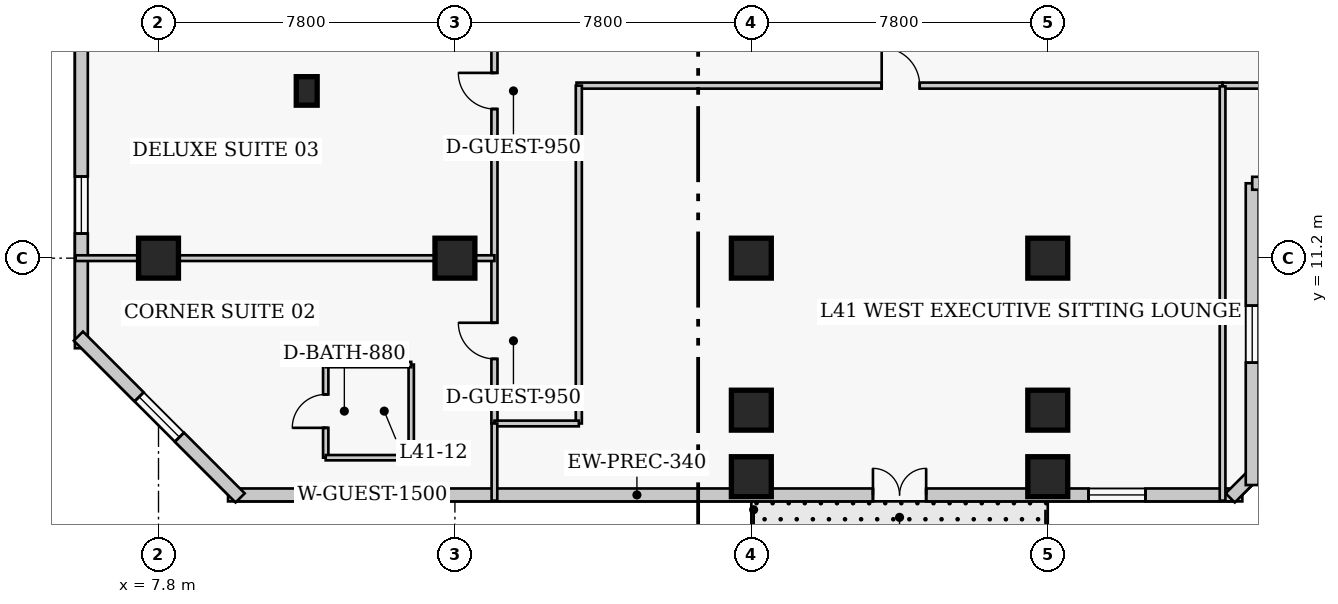
"""IFC4 building model, lengths in metres.
Left out: names, types, materials, properties, quantities, classifications, styles, units other than length and angle.
Written with IfcOpenShell. Run it as: python <this file> out.ifc"""

import sys

from ifc_helpers import new_model, si_unit, direction, frame, frame_2d, origin, origin_2d, place, context, subcontext, project, spatial, rectangle, extrude, element, fill, save


model = new_model("IFC4")
c1 = context("Model", 3, precision=1e-05, world=origin(), true_north=direction((0.0, 1.0)))
c2 = subcontext(c1, "Body", "Model", "MODEL_VIEW")
j1 = project(units=[si_unit("LENGTHUNIT", "METRE"), si_unit("PLANEANGLEUNIT", "RADIAN")], contexts=[c1])
p1 = place(None, origin())
s1 = spatial("IfcSite", under=j1, at=p1, CompositionType="ELEMENT")
p2 = place(p1, origin())
s2 = spatial("IfcBuilding", under=s1, at=p2, CompositionType="ELEMENT")
p3 = place(p2, frame((0.0, 0.0, 165.0)))
s3 = spatial("IfcBuildingStorey", under=s2, at=p3, CompositionType="ELEMENT", Elevation=165.0)
for number, where, z_axis, x_axis in (
    (1, (7.8, 11.2, 0.0), (0.0, 0.0, 1.0), (1.0, 0.0, 0.0)),
    (2, (15.6, 11.2, 0.0), (0.0, 0.0, 1.0), (1.0, 0.0, 0.0)),
    (3, (23.4, 11.2, 0.0), (0.0, 0.0, 1.0), (1.0, 0.0, 0.0)),
    (4, (31.2, 11.2, 0.0), (0.0, 0.0, 1.0), (1.0, 0.0, 0.0)),
    (5, (23.4, 7.2, 0.0), (0.0, 0.0, 1.0), (1.0, 0.0, 0.0)),
    (6, (31.2, 7.2, 0.0), (0.0, 0.0, 1.0), (1.0, 0.0, 0.0)),
    (7, (23.4, 5.45, 0.0), (0.0, 0.0, 1.0), (1.0, 0.0, 0.0)),
    (8, (31.2, 5.45, 0.0), (0.0, 0.0, 1.0), (1.0, 0.0, 0.0)),
):
    element("IfcColumn", number, at=place(p3, frame(where, z_axis=z_axis, x_axis=x_axis)), inside=s3, PredefinedType="COLUMN", context=c2, shape_type="SweptSolid", body=[
        extrude(rectangle(XDim=1.05, YDim=1.05, at=origin_2d()), origin(), (0.0, 0.0, 1.0), 3.8),
    ])
p4 = place(p3, frame((11.7, 15.6, 0.0), z_axis=(0.0, 0.0, 1.0), x_axis=(1.0, 0.0, 0.0)))
e9 = element("IfcColumn", 9, at=p4, inside=s3, PredefinedType="PILASTER", context=c2, shape_type="SweptSolid", body=[
    extrude(rectangle(XDim=0.55, YDim=0.75, at=origin_2d()), origin(), (0.0, 0.0, 1.0), 3.8),
])
p5 = place(p3, frame((9.63, 4.97, 0.0), z_axis=(0.0, 0.0, 1.0), x_axis=(1.0, 0.0, 0.0)))
e10 = element("IfcWall", 10, at=p5, inside=s3, PredefinedType="SOLIDWALL", context=c2, shape_type="SweptSolid", body=[
    extrude(rectangle(XDim=26.69, YDim=0.34, at=frame_2d((13.345, 0.0))), origin(), (0.0, 0.0, 1.0), 3.55),
])
p6 = place(p5, frame((16.97, 0.0, 0.0)))
e11 = element("IfcOpeningElement", 11, at=p6, cuts=e10, PredefinedType="OPENING", context=c2, shape_type="SweptSolid", body=[
    extrude(rectangle(XDim=1.4, YDim=2.15, at=frame_2d((0.7, 1.075))), frame((0.0, 0.18, 0.0), z_axis=(0.0, -1.0, 0.0), x_axis=(1.0, 0.0, 0.0)), (0.0, 0.0, 1.0), 0.36),
])
p7 = place(p5, frame((3.048, 0.0, 0.85)))
e12 = element("IfcOpeningElement", 12, at=p7, cuts=e10, PredefinedType="OPENING", context=c2, shape_type="SweptSolid", body=[
    extrude(rectangle(XDim=1.5, YDim=1.75, at=frame_2d((0.75, 0.875))), frame((0.0, 0.18, 0.0), z_axis=(0.0, -1.0, 0.0), x_axis=(1.0, 0.0, 0.0)), (0.0, 0.0, 1.0), 0.36),
])
p8 = place(p5, frame((22.642, 0.0, 0.85)))
e13 = element("IfcOpeningElement", 13, at=p8, cuts=e10, PredefinedType="OPENING", context=c2, shape_type="SweptSolid", body=[
    extrude(rectangle(XDim=1.5, YDim=1.75, at=frame_2d((0.75, 0.875))), frame((0.0, 0.18, 0.0), z_axis=(0.0, -1.0, 0.0), x_axis=(1.0, 0.0, 0.0)), (0.0, 0.0, 1.0), 0.36),
])
p9 = place(p3, frame((36.001, 4.892, 0.0), z_axis=(0.0, 0.0, 1.0), x_axis=(0.707106781187, 0.707106781187, 0.0)))
e14 = element("IfcWall", 14, at=p9, inside=s3, PredefinedType="SOLIDWALL", context=c2, shape_type="SweptSolid", body=[
    extrude(rectangle(XDim=0.929, YDim=0.34, at=frame_2d((0.464, 0.0))), origin(), (0.0, 0.0, 1.0), 3.55),
])
p10 = place(p3, frame((36.58, 5.23, 0.0), z_axis=(0.0, 0.0, 1.0), x_axis=(0.0, 1.0, 0.0)))
e15 = element("IfcWall", 15, at=p10, inside=s3, PredefinedType="SOLIDWALL", context=c2, shape_type="SweptSolid", body=[
    extrude(rectangle(XDim=7.94, YDim=0.34, at=frame_2d((3.97, 0.0))), origin(), (0.0, 0.0, 1.0), 3.55),
])
p11 = place(p10, frame((3.22, 0.0, 0.85)))
e16 = element("IfcOpeningElement", 16, at=p11, cuts=e15, PredefinedType="OPENING", context=c2, shape_type="SweptSolid", body=[
    extrude(rectangle(XDim=1.5, YDim=1.75, at=frame_2d((0.75, 0.875))), frame((0.0, 0.18, 0.0), z_axis=(0.0, -1.0, 0.0), x_axis=(1.0, 0.0, 0.0)), (0.0, 0.0, 1.0), 0.36),
])
p12 = place(p3, frame((36.58, 13.17, 0.0), z_axis=(0.0, 0.0, 1.0), x_axis=(1.0, 0.0, 0.0)))
e17 = element("IfcWall", 17, at=p12, inside=s3, PredefinedType="SOLIDWALL", context=c2, shape_type="SweptSolid", body=[
    extrude(rectangle(XDim=4.84, YDim=0.34, at=frame_2d((2.42, 0.0))), origin(), (0.0, 0.0, 1.0), 3.55),
])
p13 = place(p12, frame((1.67, 0.0, 0.85)))
e18 = element("IfcOpeningElement", 18, at=p13, cuts=e17, PredefinedType="OPENING", context=c2, shape_type="SweptSolid", body=[
    extrude(rectangle(XDim=1.5, YDim=1.75, at=frame_2d((0.75, 0.875))), frame((0.0, 0.18, 0.0), z_axis=(0.0, -1.0, 0.0), x_axis=(1.0, 0.0, 0.0)), (0.0, 0.0, 1.0), 0.36),
])
p14 = place(p3, frame((5.77, 38.97, 0.0), z_axis=(0.0, 0.0, 1.0), x_axis=(0.0, -1.0, 0.0)))
e19 = element("IfcWall", 19, at=p14, inside=s3, PredefinedType="SOLIDWALL", context=c2, shape_type="SweptSolid", body=[
    extrude(rectangle(XDim=30.14, YDim=0.34, at=frame_2d((15.07, 0.0))), origin(), (0.0, 0.0, 1.0), 3.55),
])
p15 = place(p14, frame((3.667, 0.0, 0.85)))
e20 = element("IfcOpeningElement", 20, at=p15, cuts=e19, PredefinedType="OPENING", context=c2, shape_type="SweptSolid", body=[
    extrude(rectangle(XDim=1.5, YDim=1.75, at=frame_2d((0.75, 0.875))), frame((0.0, 0.18, 0.0), z_axis=(0.0, -1.0, 0.0), x_axis=(1.0, 0.0, 0.0)), (0.0, 0.0, 1.0), 0.36),
])
p16 = place(p14, frame((10.552, 0.0, 0.85)))
e21 = element("IfcOpeningElement", 21, at=p16, cuts=e19, PredefinedType="OPENING", context=c2, shape_type="SweptSolid", body=[
    extrude(rectangle(XDim=1.5, YDim=1.75, at=frame_2d((0.75, 0.875))), frame((0.0, 0.18, 0.0), z_axis=(0.0, -1.0, 0.0), x_axis=(1.0, 0.0, 0.0)), (0.0, 0.0, 1.0), 0.36),
])
p17 = place(p14, frame((16.938, 0.0, 0.85)))
e22 = element("IfcOpeningElement", 22, at=p17, cuts=e19, PredefinedType="OPENING", context=c2, shape_type="SweptSolid", body=[
    extrude(rectangle(XDim=1.5, YDim=1.75, at=frame_2d((0.75, 0.875))), frame((0.0, 0.18, 0.0), z_axis=(0.0, -1.0, 0.0), x_axis=(1.0, 0.0, 0.0)), (0.0, 0.0, 1.0), 0.36),
])
p18 = place(p14, frame((25.623, 0.0, 0.85)))
e23 = element("IfcOpeningElement", 23, at=p18, cuts=e19, PredefinedType="OPENING", context=c2, shape_type="SweptSolid", body=[
    extrude(rectangle(XDim=1.5, YDim=1.75, at=frame_2d((0.75, 0.875))), frame((0.0, 0.18, 0.0), z_axis=(0.0, -1.0, 0.0), x_axis=(1.0, 0.0, 0.0)), (0.0, 0.0, 1.0), 0.36),
])
p19 = place(p3, frame((5.692, 9.148, 0.0), z_axis=(0.0, 0.0, 1.0), x_axis=(0.707106781187, -0.707106781187, 0.0)))
e24 = element("IfcWall", 24, at=p19, inside=s3, PredefinedType="SOLIDWALL", context=c2, shape_type="SweptSolid", body=[
    extrude(rectangle(XDim=6.02, YDim=0.34, at=frame_2d((3.01, 0.0))), origin(), (0.0, 0.0, 1.0), 3.55),
])
p20 = place(p19, frame((2.26, 0.0, 0.85)))
e25 = element("IfcOpeningElement", 25, at=p20, cuts=e24, PredefinedType="OPENING", context=c2, shape_type="SweptSolid", body=[
    extrude(rectangle(XDim=1.5, YDim=1.75, at=frame_2d((0.75, 0.875))), frame((0.0, 0.18, 0.0), z_axis=(0.0, -1.0, 0.0), x_axis=(1.0, 0.0, 0.0)), (0.0, 0.0, 1.0), 0.36),
])
p21 = place(p3, frame((18.8, 15.74, 0.0), z_axis=(0.0, 0.0, 1.0), x_axis=(1.0, 0.0, 0.0)))
e26 = element("IfcWall", 26, at=p21, inside=s3, PredefinedType="PARTITIONING", context=c2, shape_type="SweptSolid", body=[
    extrude(rectangle(XDim=17.0, YDim=0.16, at=frame_2d((8.5, 0.0))), origin(), (0.0, 0.0, 1.0), 3.55),
])
p22 = place(p21, frame((8.03, 0.0, 0.0)))
e27 = element("IfcOpeningElement", 27, at=p22, cuts=e26, PredefinedType="OPENING", context=c2, shape_type="SweptSolid", body=[
    extrude(rectangle(XDim=1.0, YDim=2.15, at=frame_2d((0.5, 1.075))), frame((0.0, 0.09, 0.0), z_axis=(0.0, -1.0, 0.0), x_axis=(1.0, 0.0, 0.0)), (0.0, 0.0, 1.0), 0.18),
])
p23 = place(p3, frame((35.8, 15.74, 0.0), z_axis=(0.0, 0.0, 1.0), x_axis=(1.0, 0.0, 0.0)))
e28 = element("IfcWall", 28, at=p23, inside=s3, PredefinedType="PARTITIONING", context=c2, shape_type="SweptSolid", body=[
    extrude(rectangle(XDim=23.5, YDim=0.16, at=frame_2d((11.75, 0.0))), origin(), (0.0, 0.0, 1.0), 3.55),
])
p24 = place(p23, frame((3.66, 0.0, 0.0)))
e29 = element("IfcOpeningElement", 29, at=p24, cuts=e28, PredefinedType="OPENING", context=c2, shape_type="SweptSolid", body=[
    extrude(rectangle(XDim=0.95, YDim=2.1, at=frame_2d((0.475, 1.05))), frame((0.0, 0.09, 0.0), z_axis=(0.0, -1.0, 0.0), x_axis=(1.0, 0.0, 0.0)), (0.0, 0.0, 1.0), 0.18),
])
p25 = place(p23, frame((16.805, 0.0, 0.0)))
e30 = element("IfcOpeningElement", 30, at=p25, cuts=e28, PredefinedType="OPENING", context=c2, shape_type="SweptSolid", body=[
    extrude(rectangle(XDim=1.0, YDim=2.15, at=frame_2d((0.5, 1.075))), frame((0.0, 0.09, 0.0), z_axis=(0.0, -1.0, 0.0), x_axis=(1.0, 0.0, 0.0)), (0.0, 0.0, 1.0), 0.18),
])
p26 = place(p3, frame((16.64, 6.85, 0.0), z_axis=(0.0, 0.0, 1.0), x_axis=(0.0, 1.0, 0.0)))
e31 = element("IfcWall", 31, at=p26, inside=s3, PredefinedType="PARTITIONING", context=c2, shape_type="SweptSolid", body=[
    extrude(rectangle(XDim=33.8, YDim=0.16, at=frame_2d((16.9, 0.0))), origin(), (0.0, 0.0, 1.0), 3.55),
])
p27 = place(p26, frame((1.7, 0.0, 0.0)))
e32 = element("IfcOpeningElement", 32, at=p27, cuts=e31, PredefinedType="OPENING", context=c2, shape_type="SweptSolid", body=[
    extrude(rectangle(XDim=0.95, YDim=2.1, at=frame_2d((0.475, 1.05))), frame((0.0, 0.09, 0.0), z_axis=(0.0, -1.0, 0.0), x_axis=(1.0, 0.0, 0.0)), (0.0, 0.0, 1.0), 0.18),
])
p28 = place(p26, frame((8.275, 0.0, 0.0)))
e33 = element("IfcOpeningElement", 33, at=p28, cuts=e31, PredefinedType="OPENING", context=c2, shape_type="SweptSolid", body=[
    extrude(rectangle(XDim=0.95, YDim=2.1, at=frame_2d((0.475, 1.05))), frame((0.0, 0.09, 0.0), z_axis=(0.0, -1.0, 0.0), x_axis=(1.0, 0.0, 0.0)), (0.0, 0.0, 1.0), 0.18),
])
p29 = place(p26, frame((17.075, 0.0, 0.0)))
e34 = element("IfcOpeningElement", 34, at=p29, cuts=e31, PredefinedType="OPENING", context=c2, shape_type="SweptSolid", body=[
    extrude(rectangle(XDim=0.95, YDim=2.1, at=frame_2d((0.475, 1.05))), frame((0.0, 0.09, 0.0), z_axis=(0.0, -1.0, 0.0), x_axis=(1.0, 0.0, 0.0)), (0.0, 0.0, 1.0), 0.18),
])
p30 = place(p26, frame((25.125, 0.0, 0.0)))
e35 = element("IfcOpeningElement", 35, at=p30, cuts=e31, PredefinedType="OPENING", context=c2, shape_type="SweptSolid", body=[
    extrude(rectangle(XDim=0.95, YDim=2.1, at=frame_2d((0.475, 1.05))), frame((0.0, 0.09, 0.0), z_axis=(0.0, -1.0, 0.0), x_axis=(1.0, 0.0, 0.0)), (0.0, 0.0, 1.0), 0.18),
])
p31 = place(p26, frame((32.36, 0.0, 0.0)))
e36 = element("IfcOpeningElement", 36, at=p31, cuts=e31, PredefinedType="OPENING", context=c2, shape_type="SweptSolid", body=[
    extrude(rectangle(XDim=1.0, YDim=2.15, at=frame_2d((0.5, 1.075))), frame((0.0, 0.09, 0.0), z_axis=(0.0, -1.0, 0.0), x_axis=(1.0, 0.0, 0.0)), (0.0, 0.0, 1.0), 0.18),
])
p32 = place(p3, frame((18.86, 6.85, 0.0), z_axis=(0.0, 0.0, 1.0), x_axis=(0.0, 1.0, 0.0)))
e37 = element("IfcWall", 37, at=p32, inside=s3, PredefinedType="PARTITIONING", context=c2, shape_type="SweptSolid", body=[
    extrude(rectangle(XDim=8.89, YDim=0.16, at=frame_2d((4.445, 0.0))), origin(), (0.0, 0.0, 1.0), 3.55),
])
p33 = place(p3, frame((16.64, 6.85, 0.0), z_axis=(0.0, 0.0, 1.0), x_axis=(1.0, 0.0, 0.0)))
e38 = element("IfcWall", 38, at=p33, inside=s3, PredefinedType="PARTITIONING", context=c2, shape_type="SweptSolid", body=[
    extrude(rectangle(XDim=2.22, YDim=0.15, at=frame_2d((1.11, 0.0))), origin(), (0.0, 0.0, 1.0), 3.55),
])
p34 = place(p3, frame((35.8, 4.82, 0.0), z_axis=(0.0, 0.0, 1.0), x_axis=(0.0, 1.0, 0.0)))
e39 = element("IfcWall", 39, at=p34, inside=s3, PredefinedType="PARTITIONING", context=c2, shape_type="SweptSolid", body=[
    extrude(rectangle(XDim=10.9, YDim=0.15, at=frame_2d((5.45, 0.0))), origin(), (0.0, 0.0, 1.0), 3.55),
])
p35 = place(p3, frame((16.64, 4.82, 0.0), z_axis=(0.0, 0.0, 1.0), x_axis=(0.0, 1.0, 0.0)))
e40 = element("IfcWall", 40, at=p35, inside=s3, PredefinedType="PARTITIONING", context=c2, shape_type="SweptSolid", body=[
    extrude(rectangle(XDim=2.03, YDim=0.15, at=frame_2d((1.015, 0.0))), origin(), (0.0, 0.0, 1.0), 3.55),
])
p36 = place(p3, frame((12.2, 5.95, 0.0), z_axis=(0.0, 0.0, 1.0), x_axis=(0.0, 1.0, 0.0)))
e41 = element("IfcWall", 41, at=p36, inside=s3, PredefinedType="PLUMBINGWALL", context=c2, shape_type="SweptSolid", body=[
    extrude(rectangle(XDim=2.45, YDim=0.14, at=frame_2d((1.225, 0.0))), origin(), (0.0, 0.0, 1.0), 3.55),
])
p37 = place(p36, frame((0.785, 0.0, 0.0)))
e42 = element("IfcOpeningElement", 42, at=p37, cuts=e41, PredefinedType="OPENING", context=c2, shape_type="SweptSolid", body=[
    extrude(rectangle(XDim=0.88, YDim=2.05, at=frame_2d((0.44, 1.025))), frame((0.0, 0.08, 0.0), z_axis=(0.0, -1.0, 0.0), x_axis=(1.0, 0.0, 0.0)), (0.0, 0.0, 1.0), 0.16),
])
p38 = place(p3, frame((14.45, 5.95, 0.0), z_axis=(0.0, 0.0, 1.0), x_axis=(0.0, 1.0, 0.0)))
e43 = element("IfcWall", 43, at=p38, inside=s3, PredefinedType="PLUMBINGWALL", context=c2, shape_type="SweptSolid", body=[
    extrude(rectangle(XDim=2.45, YDim=0.14, at=frame_2d((1.225, 0.0))), origin(), (0.0, 0.0, 1.0), 3.55),
])
for number, where, z_axis, x_axis in (
    (44, (12.2, 5.95, 0.0), (0.0, 0.0, 1.0), (1.0, 0.0, 0.0)),
    (45, (12.2, 8.4, 0.0), (0.0, 0.0, 1.0), (1.0, 0.0, 0.0)),
):
    element("IfcWall", number, at=place(p3, frame(where, z_axis=z_axis, x_axis=x_axis)), inside=s3, PredefinedType="PLUMBINGWALL", context=c2, shape_type="SweptSolid", body=[
        extrude(rectangle(XDim=2.25, YDim=0.14, at=frame_2d((1.125, 0.0))), origin(), (0.0, 0.0, 1.0), 3.55),
    ])
p39 = place(p3, frame((5.62, 11.2, 0.0), z_axis=(0.0, 0.0, 1.0), x_axis=(1.0, 0.0, 0.0)))
e46 = element("IfcWall", 46, at=p39, inside=s3, PredefinedType="PARTITIONING", context=c2, shape_type="SweptSolid", body=[
    extrude(rectangle(XDim=11.02, YDim=0.15, at=frame_2d((5.51, 0.0))), origin(), (0.0, 0.0, 1.0), 2.778),
])
p40 = place(p6, origin())
e47 = element("IfcDoor", 47, at=p40, inside=s3, OperationType="DOUBLE_DOOR_SINGLE_SWING", PredefinedType="DOOR", context=c2, shape_type="SweptSolid", body=[
    extrude(rectangle(XDim=1.4, YDim=2.15, at=frame_2d((0.7, 1.075))), frame((0.0, 0.025, 0.0), z_axis=(0.0, -1.0, 0.0), x_axis=(1.0, 0.0, 0.0)), (0.0, 0.0, 1.0), 0.05),
])
fill(e11, e47)
p41 = place(p7, origin())
e48 = element("IfcWindow", 48, at=p41, inside=s3, PartitioningType="SINGLE_PANEL", PredefinedType="WINDOW", context=c2, shape_type="SweptSolid", body=[
    extrude(rectangle(XDim=1.5, YDim=1.75, at=frame_2d((0.75, 0.875))), frame((0.0, 0.03, 0.0), z_axis=(0.0, -1.0, 0.0), x_axis=(1.0, 0.0, 0.0)), (0.0, 0.0, 1.0), 0.06),
])
fill(e12, e48)
p42 = place(p8, origin())
e49 = element("IfcWindow", 49, at=p42, inside=s3, PartitioningType="SINGLE_PANEL", PredefinedType="WINDOW", context=c2, shape_type="SweptSolid", body=[
    extrude(rectangle(XDim=1.5, YDim=1.75, at=frame_2d((0.75, 0.875))), frame((0.0, 0.03, 0.0), z_axis=(0.0, -1.0, 0.0), x_axis=(1.0, 0.0, 0.0)), (0.0, 0.0, 1.0), 0.06),
])
fill(e13, e49)
p43 = place(p11, origin())
e50 = element("IfcWindow", 50, at=p43, inside=s3, PartitioningType="SINGLE_PANEL", PredefinedType="WINDOW", context=c2, shape_type="SweptSolid", body=[
    extrude(rectangle(XDim=1.5, YDim=1.75, at=frame_2d((0.75, 0.875))), frame((0.0, 0.03, 0.0), z_axis=(0.0, -1.0, 0.0), x_axis=(1.0, 0.0, 0.0)), (0.0, 0.0, 1.0), 0.06),
])
fill(e16, e50)
p44 = place(p18, origin())
e51 = element("IfcWindow", 51, at=p44, inside=s3, PartitioningType="SINGLE_PANEL", PredefinedType="WINDOW", context=c2, shape_type="SweptSolid", body=[
    extrude(rectangle(XDim=1.5, YDim=1.75, at=frame_2d((0.75, 0.875))), frame((0.0, 0.03, 0.0), z_axis=(0.0, -1.0, 0.0), x_axis=(1.0, 0.0, 0.0)), (0.0, 0.0, 1.0), 0.06),
])
fill(e23, e51)
p45 = place(p20, origin())
e52 = element("IfcWindow", 52, at=p45, inside=s3, PartitioningType="SINGLE_PANEL", PredefinedType="WINDOW", context=c2, shape_type="SweptSolid", body=[
    extrude(rectangle(XDim=1.5, YDim=1.75, at=frame_2d((0.75, 0.875))), frame((0.0, 0.03, 0.0), z_axis=(0.0, -1.0, 0.0), x_axis=(1.0, 0.0, 0.0)), (0.0, 0.0, 1.0), 0.06),
])
fill(e25, e52)
p46 = place(p22, origin())
e53 = element("IfcDoor", 53, at=p46, inside=s3, OperationType="SINGLE_SWING_LEFT", PredefinedType="DOOR", context=c2, shape_type="SweptSolid", body=[
    extrude(rectangle(XDim=1.0, YDim=2.15, at=frame_2d((0.5, 1.075))), frame((0.0, 0.025, 0.0), z_axis=(0.0, -1.0, 0.0), x_axis=(1.0, 0.0, 0.0)), (0.0, 0.0, 1.0), 0.05),
])
fill(e27, e53)
p47 = place(p37, origin())
e54 = element("IfcDoor", 54, at=p47, inside=s3, OperationType="SINGLE_SWING_LEFT", PredefinedType="DOOR", context=c2, shape_type="SweptSolid", body=[
    extrude(rectangle(XDim=0.88, YDim=2.05, at=frame_2d((0.44, 1.025))), frame((0.0, 0.025, 0.0), z_axis=(0.0, -1.0, 0.0), x_axis=(1.0, 0.0, 0.0)), (0.0, 0.0, 1.0), 0.05),
])
fill(e42, e54)
p48 = place(p27, origin())
e55 = element("IfcDoor", 55, at=p48, inside=s3, OperationType="SINGLE_SWING_RIGHT", PredefinedType="DOOR", context=c2, shape_type="SweptSolid", body=[
    extrude(rectangle(XDim=0.95, YDim=2.1, at=frame_2d((0.475, 1.05))), frame((0.0, 0.025, 0.0), z_axis=(0.0, -1.0, 0.0), x_axis=(1.0, 0.0, 0.0)), (0.0, 0.0, 1.0), 0.05),
])
fill(e32, e55)
p49 = place(p28, origin())
e56 = element("IfcDoor", 56, at=p49, inside=s3, OperationType="SINGLE_SWING_RIGHT", PredefinedType="DOOR", context=c2, shape_type="SweptSolid", body=[
    extrude(rectangle(XDim=0.95, YDim=2.1, at=frame_2d((0.475, 1.05))), frame((0.0, 0.025, 0.0), z_axis=(0.0, -1.0, 0.0), x_axis=(1.0, 0.0, 0.0)), (0.0, 0.0, 1.0), 0.05),
])
fill(e33, e56)
save(model, sys.argv[1])
